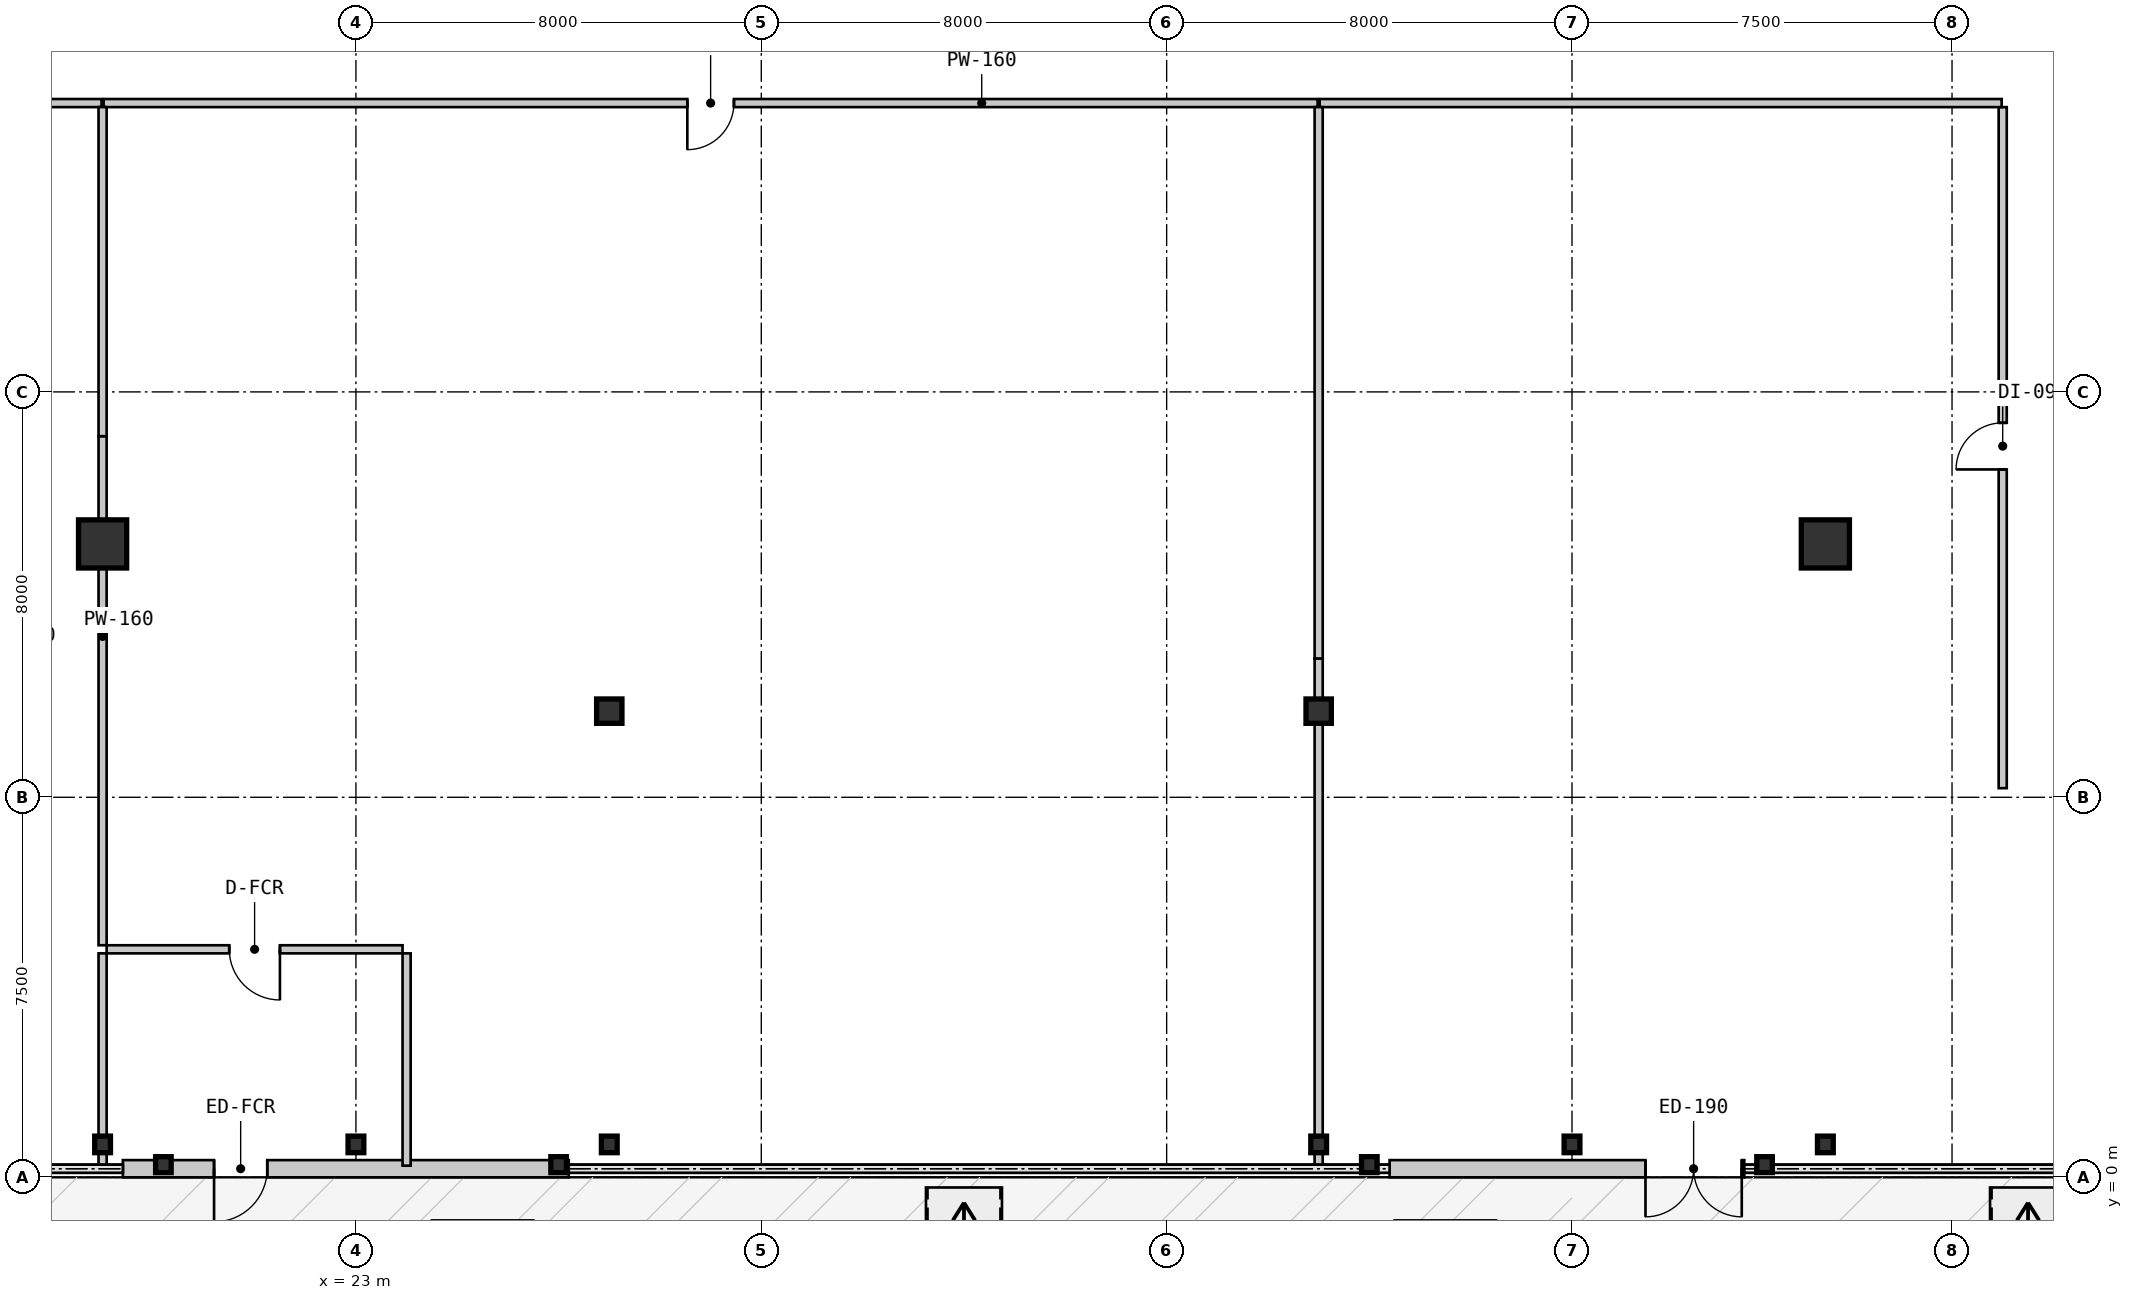
"""IFC4 building model, lengths in metres.
Left out: names, types, materials, properties, quantities, classifications, styles, units other than length and angle.
Written with IfcOpenShell. Run it as: python <this file> out.ifc"""

import sys

from ifc_helpers import new_model, si_unit, direction, frame, frame_2d, origin, origin_2d, place, context, subcontext, project, spatial, rectangle, i_section, extrude, source, transform, mapped, element, fill, save


model = new_model("IFC4")
c1 = context("Model", 3, precision=1e-05, world=origin(), true_north=direction((0.0, 1.0)))
c2 = subcontext(c1, "Body", "Model", "MODEL_VIEW")
j1 = project(units=[si_unit("LENGTHUNIT", "METRE"), si_unit("PLANEANGLEUNIT", "RADIAN")], contexts=[c1])
p1 = place(None, origin())
s1 = spatial("IfcSite", under=j1, at=p1, CompositionType="ELEMENT")
p2 = place(p1, origin())
s2 = spatial("IfcBuilding", under=s1, at=p2, CompositionType="ELEMENT")
p3 = place(p2, origin())
s3 = spatial("IfcBuildingStorey", under=s2, at=p3, CompositionType="ELEMENT", Elevation=0.0)
m1 = source(origin(), c2, "Body", "SweptSolid", [
    extrude(i_section(OverallWidth=0.5, OverallDepth=0.48, WebThickness=0.028, FlangeThickness=0.044, at=origin_2d()), origin(), (0.0, 0.0, 1.0), 4.55),
])
for number, where, z_axis, x_axis in (
    (1, (28.0, 9.2, 0.0), (0.0, 0.0, 1.0), (1.0, 0.0, 0.0)),
    (2, (42.0, 9.2, 0.0), (0.0, 0.0, 1.0), (1.0, 0.0, 0.0)),
):
    element("IfcColumn", number, at=place(p3, frame(where, z_axis=z_axis, x_axis=x_axis)), inside=s3, PredefinedType="COLUMN", context=c2, shape_type="MappedRepresentation", body=[
        mapped(m1, transform((0.0, 0.0, 0.0), scale=1.0)),
    ])
m2 = source(origin(), c2, "Body", "SweptSolid", [
    extrude(rectangle(XDim=0.95, YDim=0.95, at=origin_2d()), origin(), (0.0, 0.0, 1.0), 4.55),
])
for number, where, z_axis, x_axis in (
    (3, (18.0, 12.5, 0.0), (0.0, 0.0, 1.0), (1.0, 0.0, 0.0)),
    (4, (52.0, 12.5, 0.0), (0.0, 0.0, 1.0), (1.0, 0.0, 0.0)),
):
    element("IfcColumn", number, at=place(p3, frame(where, z_axis=z_axis, x_axis=x_axis)), inside=s3, PredefinedType="COLUMN", context=c2, shape_type="MappedRepresentation", body=[
        mapped(m2, transform((0.0, 0.0, 0.0), scale=1.0)),
    ])
m3 = source(origin(), c2, "Body", "SweptSolid", [
    extrude(i_section(OverallWidth=0.311, OverallDepth=0.327, WebThickness=0.016, FlangeThickness=0.025, at=origin_2d()), origin(), (0.0, 0.0, 1.0), 4.55),
])
for number, where, z_axis, x_axis in (
    (5, (28.0, 0.65, 0.0), (0.0, 0.0, 1.0), (1.0, 0.0, 0.0)),
    (6, (42.0, 0.65, 0.0), (0.0, 0.0, 1.0), (1.0, 0.0, 0.0)),
    (7, (18.0, 0.65, 0.0), (0.0, 0.0, 1.0), (1.0, 0.0, 0.0)),
    (8, (23.0, 0.65, 0.0), (0.0, 0.0, 1.0), (1.0, 0.0, 0.0)),
    (9, (47.0, 0.65, 0.0), (0.0, 0.0, 1.0), (1.0, 0.0, 0.0)),
    (10, (52.0, 0.65, 0.0), (0.0, 0.0, 1.0), (1.0, 0.0, 0.0)),
):
    element("IfcColumn", number, at=place(p3, frame(where, z_axis=z_axis, x_axis=x_axis)), inside=s3, PredefinedType="COLUMN", context=c2, shape_type="MappedRepresentation", body=[
        mapped(m3, transform((0.0, 0.0, 0.0), scale=1.0)),
    ])
m4 = source(origin(), c2, "Body", "SweptSolid", [
    extrude(i_section(OverallWidth=0.307, OverallDepth=0.315, WebThickness=0.012, FlangeThickness=0.019, at=origin_2d()), origin(), (0.0, 0.0, 1.0), 4.55),
])
for number, where, z_axis, x_axis in (
    (11, (19.2, 0.25, 0.0), (0.0, 0.0, 1.0), (1.0, 0.0, 0.0)),
    (12, (27.0, 0.25, 0.0), (0.0, 0.0, 1.0), (1.0, 0.0, 0.0)),
    (13, (43.0, 0.25, 0.0), (0.0, 0.0, 1.0), (1.0, 0.0, 0.0)),
    (14, (50.8, 0.25, 0.0), (0.0, 0.0, 1.0), (1.0, 0.0, 0.0)),
):
    element("IfcColumn", number, at=place(p3, frame(where, z_axis=z_axis, x_axis=x_axis)), inside=s3, PredefinedType="PILASTER", context=c2, shape_type="MappedRepresentation", body=[
        mapped(m4, transform((0.0, 0.0, 0.0), scale=1.0)),
    ])
m5 = source(origin(), c2, "Body", "SweptSolid", [
    extrude(rectangle(XDim=8.8, YDim=0.34, at=frame_2d((4.4, 0.0))), origin(), (0.0, 0.0, 1.0), 4.29),
])
p4 = place(p3, frame((18.4, 0.17, 0.0), z_axis=(0.0, 0.0, 1.0), x_axis=(1.0, 0.0, 0.0)))
e15 = element("IfcWall", 15, at=p4, inside=s3, PredefinedType="SOLIDWALL", context=c2, shape_type="MappedRepresentation", body=[
    mapped(m5, transform((0.0, 0.0, 0.0), scale=1.0)),
])
m6 = source(origin(), c2, "Body", "SweptSolid", [
    extrude(rectangle(XDim=1.05, YDim=2.15, at=frame_2d((0.525, 1.075))), frame((0.0, 0.18, 0.0), z_axis=(0.0, -1.0, 0.0), x_axis=(1.0, 0.0, 0.0)), (0.0, 0.0, 1.0), 0.36),
])
p5 = place(p4, frame((1.8, 0.0, 0.0)))
e16 = element("IfcOpeningElement", 16, at=p5, cuts=e15, PredefinedType="OPENING", context=c2, shape_type="MappedRepresentation", body=[
    mapped(m6, transform((0.0, 0.0, 0.0), scale=1.0)),
])
m7 = source(origin(), c2, "Body", "SweptSolid", [
    extrude(rectangle(XDim=7.0, YDim=0.34, at=frame_2d((3.5, 0.0))), origin(), (0.0, 0.0, 1.0), 4.29),
])
p6 = place(p3, frame((43.4, 0.17, 0.0), z_axis=(0.0, 0.0, 1.0), x_axis=(1.0, 0.0, 0.0)))
e17 = element("IfcWall", 17, at=p6, inside=s3, PredefinedType="SOLIDWALL", context=c2, shape_type="MappedRepresentation", body=[
    mapped(m7, transform((0.0, 0.0, 0.0), scale=1.0)),
])
m8 = source(origin(), c2, "Body", "SweptSolid", [
    extrude(rectangle(XDim=1.9, YDim=2.4, at=frame_2d((0.95, 1.2))), frame((0.0, 0.18, 0.0), z_axis=(0.0, -1.0, 0.0), x_axis=(1.0, 0.0, 0.0)), (0.0, 0.0, 1.0), 0.36),
])
p7 = place(p6, frame((5.05, 0.0, 0.0)))
e18 = element("IfcOpeningElement", 18, at=p7, cuts=e17, PredefinedType="OPENING", context=c2, shape_type="MappedRepresentation", body=[
    mapped(m8, transform((0.0, 0.0, 0.0), scale=1.0)),
])
m9 = source(origin(), c2, "Body", "SweptSolid", [
    extrude(rectangle(XDim=23.959, YDim=0.16, at=frame_2d((11.98, 0.0))), origin(), (0.0, 0.0, 1.0), 4.29),
])
p8 = place(p3, frame((41.98, 21.2, 0.0), z_axis=(0.0, 0.0, 1.0), x_axis=(-1.0, 0.0, 0.0)))
e19 = element("IfcWall", 19, at=p8, inside=s3, PredefinedType="PARTITIONING", context=c2, shape_type="MappedRepresentation", body=[
    mapped(m9, transform((0.0, 0.0, 0.0), scale=1.0)),
])
m10 = source(origin(), c2, "Body", "SweptSolid", [
    extrude(rectangle(XDim=0.92, YDim=2.1, at=frame_2d((0.46, 1.05))), frame((0.0, 0.09, 0.0), z_axis=(0.0, -1.0, 0.0), x_axis=(1.0, 0.0, 0.0)), (0.0, 0.0, 1.0), 0.18),
])
p9 = place(p8, frame((11.52, 0.0, 0.0)))
e20 = element("IfcOpeningElement", 20, at=p9, cuts=e19, PredefinedType="OPENING", context=c2, shape_type="MappedRepresentation", body=[
    mapped(m10, transform((0.0, 0.0, 0.0), scale=1.0)),
])
m11 = source(origin(), c2, "Body", "SweptSolid", [
    extrude(rectangle(XDim=13.44, YDim=0.16, at=frame_2d((6.72, 0.0))), origin(), (0.0, 0.0, 1.0), 4.29),
])
p10 = place(p3, frame((55.5, 7.68, 0.0), z_axis=(0.0, 0.0, 1.0), x_axis=(0.0, 1.0, 0.0)))
e21 = element("IfcWall", 21, at=p10, inside=s3, PredefinedType="PARTITIONING", context=c2, shape_type="MappedRepresentation", body=[
    mapped(m11, transform((0.0, 0.0, 0.0), scale=1.0)),
])
p11 = place(p10, frame((6.29, 0.0, 0.0)))
e22 = element("IfcOpeningElement", 22, at=p11, cuts=e21, PredefinedType="OPENING", context=c2, shape_type="MappedRepresentation", body=[
    mapped(m10, transform((0.0, 0.0, 0.0), scale=1.0)),
])
m12 = source(origin(), c2, "Body", "SweptSolid", [
    extrude(rectangle(XDim=13.459, YDim=0.16, at=frame_2d((6.73, 0.0))), origin(), (0.0, 0.0, 1.0), 4.29),
])
p12 = place(p3, frame((55.48, 21.2, 0.0), z_axis=(0.0, 0.0, 1.0), x_axis=(-1.0, 0.0, 0.0)))
e23 = element("IfcWall", 23, at=p12, inside=s3, PredefinedType="PARTITIONING", context=c2, shape_type="MappedRepresentation", body=[
    mapped(m12, transform((0.0, 0.0, 0.0), scale=1.0)),
])
m13 = source(origin(), c2, "Body", "SweptSolid", [
    extrude(rectangle(XDim=2.76, YDim=0.16, at=frame_2d((1.38, 0.0))), origin(), (0.0, 0.0, 1.0), 4.29),
])
p13 = place(p3, frame((17.98, 21.2, 0.0), z_axis=(0.0, 0.0, 1.0), x_axis=(-1.0, 0.0, 0.0)))
e24 = element("IfcWall", 24, at=p13, inside=s3, PredefinedType="PARTITIONING", context=c2, shape_type="MappedRepresentation", body=[
    mapped(m13, transform((0.0, 0.0, 0.0), scale=1.0)),
])
m14 = source(origin(), c2, "Body", "SweptSolid", [
    extrude(rectangle(XDim=5.84, YDim=0.16, at=frame_2d((2.92, 0.0))), origin(), (0.0, 0.0, 1.0), 4.29),
])
p14 = place(p3, frame((18.08, 4.5, 0.0), z_axis=(0.0, 0.0, 1.0), x_axis=(1.0, 0.0, 0.0)))
e25 = element("IfcWall", 25, at=p14, inside=s3, PredefinedType="PARTITIONING", context=c2, shape_type="MappedRepresentation", body=[
    mapped(m14, transform((0.0, 0.0, 0.0), scale=1.0)),
])
m15 = source(origin(), c2, "Body", "SweptSolid", [
    extrude(rectangle(XDim=1.0, YDim=2.1, at=frame_2d((0.5, 1.05))), frame((0.0, 0.09, 0.0), z_axis=(0.0, -1.0, 0.0), x_axis=(1.0, 0.0, 0.0)), (0.0, 0.0, 1.0), 0.18),
])
p15 = place(p14, frame((2.42, 0.0, 0.0)))
e26 = element("IfcOpeningElement", 26, at=p15, cuts=e25, PredefinedType="OPENING", context=c2, shape_type="MappedRepresentation", body=[
    mapped(m15, transform((0.0, 0.0, 0.0), scale=1.0)),
])
m16 = source(origin(), c2, "Body", "SweptSolid", [
    extrude(rectangle(XDim=4.19, YDim=0.16, at=frame_2d((2.095, 0.0))), origin(), (0.0, 0.0, 1.0), 4.29),
])
p16 = place(p3, frame((24.0, 4.42, 0.0), z_axis=(0.0, 0.0, 1.0), x_axis=(0.0, -1.0, 0.0)))
e27 = element("IfcWall", 27, at=p16, inside=s3, PredefinedType="PARTITIONING", context=c2, shape_type="MappedRepresentation", body=[
    mapped(m16, transform((0.0, 0.0, 0.0), scale=1.0)),
])
m17 = source(origin(), c2, "Body", "SweptSolid", [
    extrude(rectangle(XDim=0.42, YDim=0.16, at=frame_2d((0.21, 0.0))), origin(), (0.0, 0.0, 1.0), 4.29),
])
p17 = place(p3, frame((18.0, 0.23, 0.0), z_axis=(0.0, 0.0, 1.0), x_axis=(0.0, 1.0, 0.0)))
e28 = element("IfcWall", 28, at=p17, inside=s3, PredefinedType="PARTITIONING", context=c2, shape_type="MappedRepresentation", body=[
    mapped(m17, transform((0.0, 0.0, 0.0), scale=1.0)),
])
m18 = source(origin(), c2, "Body", "SweptSolid", [
    extrude(rectangle(XDim=3.77, YDim=0.16, at=frame_2d((1.885, 0.0))), origin(), (0.0, 0.0, 1.0), 3.757),
])
p18 = place(p3, frame((18.0, 0.65, 0.0), z_axis=(0.0, 0.0, 1.0), x_axis=(0.0, 1.0, 0.0)))
e29 = element("IfcWall", 29, at=p18, inside=s3, PredefinedType="PARTITIONING", context=c2, shape_type="MappedRepresentation", body=[
    mapped(m18, transform((0.0, 0.0, 0.0), scale=1.0)),
])
m19 = source(origin(), c2, "Body", "SweptSolid", [
    extrude(rectangle(XDim=10.884, YDim=0.16, at=frame_2d((5.442, 0.0))), origin(), (0.0, 0.0, 1.0), 4.29),
])
p19 = place(p3, frame((42.0, 21.12, 0.0), z_axis=(0.0, 0.0, 1.0), x_axis=(0.0, -1.0, 0.0)))
e30 = element("IfcWall", 30, at=p19, inside=s3, PredefinedType="PARTITIONING", context=c2, shape_type="MappedRepresentation", body=[
    mapped(m19, transform((0.0, 0.0, 0.0), scale=1.0)),
])
m20 = source(origin(), c2, "Body", "SweptSolid", [
    extrude(rectangle(XDim=1.051, YDim=0.16, at=frame_2d((0.526, 0.0))), origin(), (0.0, 0.0, 1.0), 3.688),
])
p20 = place(p3, frame((42.0, 10.236, 0.0), z_axis=(0.0, 0.0, 1.0), x_axis=(0.0, -1.0, 0.0)))
e31 = element("IfcWall", 31, at=p20, inside=s3, PredefinedType="PARTITIONING", context=c2, shape_type="MappedRepresentation", body=[
    mapped(m20, transform((0.0, 0.0, 0.0), scale=1.0)),
])
m21 = source(origin(), c2, "Body", "SweptSolid", [
    extrude(rectangle(XDim=8.535, YDim=0.16, at=frame_2d((4.268, 0.0))), origin(), (0.0, 0.0, 1.0), 3.757),
])
p21 = place(p3, frame((42.0, 9.185, 0.0), z_axis=(0.0, 0.0, 1.0), x_axis=(0.0, -1.0, 0.0)))
e32 = element("IfcWall", 32, at=p21, inside=s3, PredefinedType="PARTITIONING", context=c2, shape_type="MappedRepresentation", body=[
    mapped(m21, transform((0.0, 0.0, 0.0), scale=1.0)),
])
p22 = place(p3, frame((42.0, 0.65, 0.0), z_axis=(0.0, 0.0, 1.0), x_axis=(0.0, -1.0, 0.0)))
e33 = element("IfcWall", 33, at=p22, inside=s3, PredefinedType="PARTITIONING", context=c2, shape_type="MappedRepresentation", body=[
    mapped(m17, transform((0.0, 0.0, 0.0), scale=1.0)),
])
m22 = source(origin(), c2, "Body", "SweptSolid", [
    extrude(rectangle(XDim=10.046, YDim=0.16, at=frame_2d((5.023, 0.0))), origin(), (0.0, 0.0, 1.0), 3.757),
])
p23 = place(p3, frame((18.0, 4.58, 0.0), z_axis=(0.0, 0.0, 1.0), x_axis=(0.0, 1.0, 0.0)))
e34 = element("IfcWall", 34, at=p23, inside=s3, PredefinedType="PARTITIONING", context=c2, shape_type="MappedRepresentation", body=[
    mapped(m22, transform((0.0, 0.0, 0.0), scale=1.0)),
])
m23 = source(origin(), c2, "Body", "SweptSolid", [
    extrude(rectangle(XDim=6.494, YDim=0.16, at=frame_2d((3.247, 0.0))), origin(), (0.0, 0.0, 1.0), 4.29),
])
p24 = place(p3, frame((18.0, 14.626, 0.0), z_axis=(0.0, 0.0, 1.0), x_axis=(0.0, 1.0, 0.0)))
e35 = element("IfcWall", 35, at=p24, inside=s3, PredefinedType="PARTITIONING", context=c2, shape_type="MappedRepresentation", body=[
    mapped(m23, transform((0.0, 0.0, 0.0), scale=1.0)),
])
m24 = source(origin(), c2, "Body", "SweptSolid", [
    extrude(rectangle(XDim=1.05, YDim=2.15, at=frame_2d((0.525, 1.075))), frame((0.0, 0.025, 0.0), z_axis=(0.0, -1.0, 0.0), x_axis=(1.0, 0.0, 0.0)), (0.0, 0.0, 1.0), 0.05),
])
p25 = place(p5, frame((1.05, 0.0, 0.0), z_axis=(0.0, 0.0, 1.0), x_axis=(-1.0, 0.0, 0.0)))
e36 = element("IfcDoor", 36, at=p25, inside=s3, OperationType="SINGLE_SWING_RIGHT", PredefinedType="DOOR", context=c2, shape_type="MappedRepresentation", body=[
    mapped(m24, transform((0.0, 0.0, 0.0), scale=1.0)),
])
fill(e16, e36)
m25 = source(origin(), c2, "Body", "SweptSolid", [
    extrude(rectangle(XDim=1.9, YDim=2.4, at=frame_2d((0.95, 1.2))), frame((0.0, 0.025, 0.0), z_axis=(0.0, -1.0, 0.0), x_axis=(1.0, 0.0, 0.0)), (0.0, 0.0, 1.0), 0.05),
])
p26 = place(p7, frame((1.9, 0.0, 0.0), z_axis=(0.0, 0.0, 1.0), x_axis=(-1.0, 0.0, 0.0)))
e37 = element("IfcDoor", 37, at=p26, inside=s3, OperationType="DOUBLE_DOOR_SINGLE_SWING", PredefinedType="DOOR", context=c2, shape_type="MappedRepresentation", body=[
    mapped(m25, transform((0.0, 0.0, 0.0), scale=1.0)),
])
fill(e18, e37)
p27 = place(p3, frame((0.0, 0.0, 3.72)))
p28 = place(p27, frame((25.5, -1.45, 0.13)))
e38 = element("IfcWindow", 38, at=p28, inside=s3, PartitioningType="SINGLE_PANEL", PredefinedType="SKYLIGHT", context=c2, shape_type="SweptSolid", body=[
    extrude(rectangle(XDim=2.0, YDim=1.2, at=origin_2d()), origin(), (0.0, 0.0, 1.0), 0.05),
])
p29 = place(p27, frame((44.5, -1.45, 0.13)))
e39 = element("IfcWindow", 39, at=p29, inside=s3, PartitioningType="SINGLE_PANEL", PredefinedType="SKYLIGHT", context=c2, shape_type="SweptSolid", body=[
    extrude(rectangle(XDim=2.0, YDim=1.2, at=origin_2d()), origin(), (0.0, 0.0, 1.0), 0.05),
])
m26 = source(origin(), c2, "Body", "SweptSolid", [
    extrude(rectangle(XDim=0.92, YDim=2.1, at=frame_2d((0.46, 1.05))), frame((0.0, 0.025, 0.0), z_axis=(0.0, -1.0, 0.0), x_axis=(1.0, 0.0, 0.0)), (0.0, 0.0, 1.0), 0.05),
])
p30 = place(p9, origin())
e40 = element("IfcDoor", 40, at=p30, inside=s3, OperationType="SINGLE_SWING_RIGHT", PredefinedType="DOOR", context=c2, shape_type="MappedRepresentation", body=[
    mapped(m26, transform((0.0, 0.0, 0.0), scale=1.0)),
])
fill(e20, e40)
p31 = place(p11, origin())
e41 = element("IfcDoor", 41, at=p31, inside=s3, OperationType="SINGLE_SWING_LEFT", PredefinedType="DOOR", context=c2, shape_type="MappedRepresentation", body=[
    mapped(m26, transform((0.0, 0.0, 0.0), scale=1.0)),
])
fill(e22, e41)
m27 = source(origin(), c2, "Body", "SweptSolid", [
    extrude(rectangle(XDim=1.0, YDim=2.1, at=frame_2d((0.5, 1.05))), frame((0.0, 0.025, 0.0), z_axis=(0.0, -1.0, 0.0), x_axis=(1.0, 0.0, 0.0)), (0.0, 0.0, 1.0), 0.05),
])
p32 = place(p15, frame((1.0, 0.0, 0.0), z_axis=(0.0, 0.0, 1.0), x_axis=(-1.0, 0.0, 0.0)))
e42 = element("IfcDoor", 42, at=p32, inside=s3, OperationType="SINGLE_SWING_LEFT", PredefinedType="DOOR", context=c2, shape_type="MappedRepresentation", body=[
    mapped(m27, transform((0.0, 0.0, 0.0), scale=1.0)),
])
fill(e26, e42)
save(model, sys.argv[1])
